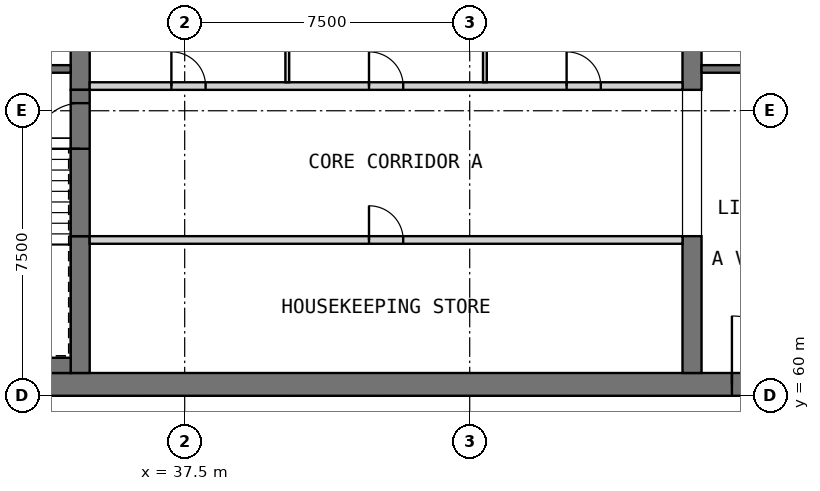
"""IFC4 building model, lengths in metres.
Left out: names, types, materials, properties, quantities, classifications, styles, units other than length and angle.
Written with IfcOpenShell. Run it as: python <this file> out.ifc"""

import sys

from ifc_helpers import new_model, si_unit, direction, frame, frame_2d, origin, place, context, subcontext, project, spatial, rectangle, extrude, element, fill, save


model = new_model("IFC4")
c1 = context("Model", 3, precision=1e-05, world=origin(), true_north=direction((0.0, 1.0)))
c2 = subcontext(c1, "Body", "Model", "MODEL_VIEW")
j1 = project(units=[si_unit("LENGTHUNIT", "METRE"), si_unit("PLANEANGLEUNIT", "RADIAN")], contexts=[c1])
p1 = place(None, origin())
s1 = spatial("IfcSite", under=j1, at=p1, CompositionType="ELEMENT")
p2 = place(p1, origin())
s2 = spatial("IfcBuilding", under=s1, at=p2, CompositionType="ELEMENT")
p3 = place(p2, frame((0.0, 0.0, 226.7)))
s3 = spatial("IfcBuildingStorey", under=s2, at=p3, CompositionType="ELEMENT", Elevation=226.7)
p4 = place(p3, frame((30.0, 60.3, 0.0), z_axis=(0.0, 0.0, 1.0), x_axis=(1.0, 0.0, 0.0)))
e1 = element("IfcWall", 1, at=p4, inside=s3, PredefinedType="SHEAR", context=c2, shape_type="SweptSolid", body=[
    extrude(rectangle(XDim=30.0, YDim=0.6, at=frame_2d((15.0, 0.0))), origin(), (0.0, 0.0, 1.0), 3.5),
])
p5 = place(p4, frame((21.9, 0.0, 0.0)))
e2 = element("IfcOpeningElement", 2, at=p5, cuts=e1, PredefinedType="OPENING", context=c2, shape_type="SweptSolid", body=[
    extrude(rectangle(XDim=1.8, YDim=2.1, at=frame_2d((0.9, 1.05))), frame((0.0, 0.31, 0.0), z_axis=(0.0, -1.0, 0.0), x_axis=(1.0, 0.0, 0.0)), (0.0, 0.0, 1.0), 0.62),
])
p6 = place(p4, frame((26.5, 0.0, 0.0)))
e3 = element("IfcOpeningElement", 3, at=p6, cuts=e1, PredefinedType="OPENING", context=c2, shape_type="SweptSolid", body=[
    extrude(rectangle(XDim=1.2, YDim=2.1, at=frame_2d((0.6, 1.05))), frame((0.0, 0.31, 0.0), z_axis=(0.0, -1.0, 0.0), x_axis=(1.0, 0.0, 0.0)), (0.0, 0.0, 1.0), 0.62),
])
p7 = place(p3, frame((34.75, 60.6, 0.0), z_axis=(0.0, 0.0, 1.0), x_axis=(0.0, 1.0, 0.0)))
e4 = element("IfcWall", 4, at=p7, inside=s3, PredefinedType="SHEAR", context=c2, shape_type="SweptSolid", body=[
    extrude(rectangle(XDim=3.6, YDim=0.5, at=frame_2d((1.8, 0.0))), origin(), (0.0, 0.0, 1.0), 3.5),
])
p8 = place(p3, frame((34.75, 68.05, 0.0), z_axis=(0.0, 0.0, 1.0), x_axis=(0.0, 1.0, 0.0)))
e5 = element("IfcWall", 5, at=p8, inside=s3, PredefinedType="SHEAR", context=c2, shape_type="SweptSolid", body=[
    extrude(rectangle(XDim=6.4, YDim=0.5, at=frame_2d((3.2, 0.0))), origin(), (0.0, 0.0, 1.0), 3.5),
])
p9 = place(p3, frame((50.85, 60.6, 0.0), z_axis=(0.0, 0.0, 1.0), x_axis=(0.0, 1.0, 0.0)))
e6 = element("IfcWall", 6, at=p9, inside=s3, PredefinedType="SHEAR", context=c2, shape_type="SweptSolid", body=[
    extrude(rectangle(XDim=3.6, YDim=0.5, at=frame_2d((1.8, 0.0))), origin(), (0.0, 0.0, 1.0), 3.5),
])
p10 = place(p3, frame((50.85, 68.05, 0.0), z_axis=(0.0, 0.0, 1.0), x_axis=(0.0, 1.0, 0.0)))
e7 = element("IfcWall", 7, at=p10, inside=s3, PredefinedType="SHEAR", context=c2, shape_type="SweptSolid", body=[
    extrude(rectangle(XDim=6.4, YDim=0.5, at=frame_2d((3.2, 0.0))), origin(), (0.0, 0.0, 1.0), 3.5),
])
p11 = place(p3, frame((35.0, 64.1, 0.0), z_axis=(0.0, 0.0, 1.0), x_axis=(1.0, 0.0, 0.0)))
e8 = element("IfcWall", 8, at=p11, inside=s3, PredefinedType="PARTITIONING", context=c2, shape_type="SweptSolid", body=[
    extrude(rectangle(XDim=15.6, YDim=0.2, at=frame_2d((7.8, 0.0))), origin(), (0.0, 0.0, 1.0), 3.25),
])
p12 = place(p11, frame((7.35, 0.0, 0.0)))
e9 = element("IfcOpeningElement", 9, at=p12, cuts=e8, PredefinedType="OPENING", context=c2, shape_type="SweptSolid", body=[
    extrude(rectangle(XDim=0.9, YDim=2.1, at=frame_2d((0.45, 1.05))), frame((0.0, 0.11, 0.0), z_axis=(0.0, -1.0, 0.0), x_axis=(1.0, 0.0, 0.0)), (0.0, 0.0, 1.0), 0.22),
])
p13 = place(p3, frame((35.0, 68.15, 0.0), z_axis=(0.0, 0.0, 1.0), x_axis=(1.0, 0.0, 0.0)))
e10 = element("IfcWall", 10, at=p13, inside=s3, PredefinedType="PARTITIONING", context=c2, shape_type="SweptSolid", body=[
    extrude(rectangle(XDim=15.6, YDim=0.2, at=frame_2d((7.8, 0.0))), origin(), (0.0, 0.0, 1.0), 3.25),
])
p14 = place(p13, frame((2.15, 0.0, 0.0)))
e11 = element("IfcOpeningElement", 11, at=p14, cuts=e10, PredefinedType="OPENING", context=c2, shape_type="SweptSolid", body=[
    extrude(rectangle(XDim=0.9, YDim=2.1, at=frame_2d((0.45, 1.05))), frame((0.0, 0.11, 0.0), z_axis=(0.0, -1.0, 0.0), x_axis=(1.0, 0.0, 0.0)), (0.0, 0.0, 1.0), 0.22),
])
p15 = place(p13, frame((7.35, 0.0, 0.0)))
e12 = element("IfcOpeningElement", 12, at=p15, cuts=e10, PredefinedType="OPENING", context=c2, shape_type="SweptSolid", body=[
    extrude(rectangle(XDim=0.9, YDim=2.1, at=frame_2d((0.45, 1.05))), frame((0.0, 0.11, 0.0), z_axis=(0.0, -1.0, 0.0), x_axis=(1.0, 0.0, 0.0)), (0.0, 0.0, 1.0), 0.22),
])
p16 = place(p13, frame((12.55, 0.0, 0.0)))
e13 = element("IfcOpeningElement", 13, at=p16, cuts=e10, PredefinedType="OPENING", context=c2, shape_type="SweptSolid", body=[
    extrude(rectangle(XDim=0.9, YDim=2.1, at=frame_2d((0.45, 1.05))), frame((0.0, 0.11, 0.0), z_axis=(0.0, -1.0, 0.0), x_axis=(1.0, 0.0, 0.0)), (0.0, 0.0, 1.0), 0.22),
])
for number, where, z_axis, x_axis in (
    (14, (40.2, 68.25, 0.0), (0.0, 0.0, 1.0), (0.0, 1.0, 0.0)),
    (15, (45.4, 68.25, 0.0), (0.0, 0.0, 1.0), (0.0, 1.0, 0.0)),
):
    element("IfcWall", number, at=place(p3, frame(where, z_axis=z_axis, x_axis=x_axis)), inside=s3, PredefinedType="PARTITIONING", context=c2, shape_type="SweptSolid", body=[
        extrude(rectangle(XDim=2.75, YDim=0.1, at=frame_2d((1.375, 0.0))), origin(), (0.0, 0.0, 1.0), 3.25),
    ])
p17 = place(p3, frame((34.75, 64.2, 0.0), z_axis=(0.0, 0.0, 1.0), x_axis=(0.0, 1.0, 0.0)))
e16 = element("IfcWall", 16, at=p17, inside=s3, PredefinedType="SOLIDWALL", context=c2, shape_type="SweptSolid", body=[
    extrude(rectangle(XDim=3.85, YDim=0.5, at=frame_2d((1.925, 0.0))), origin(), (0.0, 0.0, 1.0), 2.3),
])
p18 = place(p17, frame((2.3, 0.0, 0.0)))
e17 = element("IfcOpeningElement", 17, at=p18, cuts=e16, PredefinedType="OPENING", context=c2, shape_type="SweptSolid", body=[
    extrude(rectangle(XDim=1.2, YDim=2.1, at=frame_2d((0.6, 1.05))), frame((0.0, 0.26, 0.0), z_axis=(0.0, -1.0, 0.0), x_axis=(1.0, 0.0, 0.0)), (0.0, 0.0, 1.0), 0.52),
])
p19 = place(p3, frame((30.6, 68.6, 0.0), z_axis=(0.0, 0.0, 1.0), x_axis=(1.0, 0.0, 0.0)))
e18 = element("IfcWall", 18, at=p19, inside=s3, PredefinedType="SOLIDWALL", context=c2, shape_type="SweptSolid", body=[
    extrude(rectangle(XDim=3.9, YDim=0.2, at=frame_2d((1.95, 0.0))), origin(), (0.0, 0.0, 1.0), 3.25),
])
p20 = place(p19, frame((1.7, 0.0, 0.0)))
e19 = element("IfcOpeningElement", 19, at=p20, cuts=e18, PredefinedType="OPENING", context=c2, shape_type="SweptSolid", body=[
    extrude(rectangle(XDim=0.9, YDim=2.1, at=frame_2d((0.45, 1.05))), frame((0.0, 0.11, 0.0), z_axis=(0.0, -1.0, 0.0), x_axis=(1.0, 0.0, 0.0)), (0.0, 0.0, 1.0), 0.22),
])
p21 = place(p3, frame((51.1, 68.6, 0.0), z_axis=(0.0, 0.0, 1.0), x_axis=(1.0, 0.0, 0.0)))
e20 = element("IfcWall", 20, at=p21, inside=s3, PredefinedType="SOLIDWALL", context=c2, shape_type="SweptSolid", body=[
    extrude(rectangle(XDim=8.3, YDim=0.2, at=frame_2d((4.15, 0.0))), origin(), (0.0, 0.0, 1.0), 3.25),
])
p22 = place(p3, frame((31.0, 60.8, 0.0), z_axis=(0.0, 0.0, 1.0), x_axis=(1.0, 0.0, 0.0)))
e21 = element("IfcWall", 21, at=p22, inside=s3, PredefinedType="SOLIDWALL", context=c2, shape_type="SweptSolid", body=[
    extrude(rectangle(XDim=3.5, YDim=0.4, at=frame_2d((1.75, 0.0))), origin(), (0.0, 0.0, 1.0), 3.25),
])
p23 = place(p12, origin())
e22 = element("IfcDoor", 22, at=p23, inside=s3, OperationType="SINGLE_SWING_RIGHT", PredefinedType="DOOR", context=c2, shape_type="SweptSolid", body=[
    extrude(rectangle(XDim=0.9, YDim=2.1, at=frame_2d((0.45, 1.05))), frame((0.0, 0.025, 0.0), z_axis=(0.0, -1.0, 0.0), x_axis=(1.0, 0.0, 0.0)), (0.0, 0.0, 1.0), 0.05),
])
fill(e9, e22)
p24 = place(p14, origin())
e23 = element("IfcDoor", 23, at=p24, inside=s3, OperationType="SINGLE_SWING_RIGHT", PredefinedType="DOOR", context=c2, shape_type="SweptSolid", body=[
    extrude(rectangle(XDim=0.9, YDim=2.1, at=frame_2d((0.45, 1.05))), frame((0.0, 0.025, 0.0), z_axis=(0.0, -1.0, 0.0), x_axis=(1.0, 0.0, 0.0)), (0.0, 0.0, 1.0), 0.05),
])
fill(e11, e23)
p25 = place(p15, origin())
e24 = element("IfcDoor", 24, at=p25, inside=s3, OperationType="SINGLE_SWING_LEFT", PredefinedType="DOOR", context=c2, shape_type="SweptSolid", body=[
    extrude(rectangle(XDim=0.9, YDim=2.1, at=frame_2d((0.45, 1.05))), frame((0.0, 0.025, 0.0), z_axis=(0.0, -1.0, 0.0), x_axis=(1.0, 0.0, 0.0)), (0.0, 0.0, 1.0), 0.05),
])
fill(e12, e24)
p26 = place(p16, origin())
e25 = element("IfcDoor", 25, at=p26, inside=s3, OperationType="SINGLE_SWING_RIGHT", PredefinedType="DOOR", context=c2, shape_type="SweptSolid", body=[
    extrude(rectangle(XDim=0.9, YDim=2.1, at=frame_2d((0.45, 1.05))), frame((0.0, 0.025, 0.0), z_axis=(0.0, -1.0, 0.0), x_axis=(1.0, 0.0, 0.0)), (0.0, 0.0, 1.0), 0.05),
])
fill(e13, e25)
p27 = place(p5, origin())
e26 = element("IfcDoor", 26, at=p27, inside=s3, OperationType="DOUBLE_DOOR_SINGLE_SWING", PredefinedType="DOOR", context=c2, shape_type="SweptSolid", body=[
    extrude(rectangle(XDim=1.8, YDim=2.1, at=frame_2d((0.9, 1.05))), frame((0.0, 0.025, 0.0), z_axis=(0.0, -1.0, 0.0), x_axis=(1.0, 0.0, 0.0)), (0.0, 0.0, 1.0), 0.05),
])
fill(e2, e26)
p28 = place(p18, origin())
e27 = element("IfcDoor", 27, at=p28, inside=s3, OperationType="SINGLE_SWING_LEFT", PredefinedType="DOOR", context=c2, shape_type="SweptSolid", body=[
    extrude(rectangle(XDim=1.2, YDim=2.1, at=frame_2d((0.6, 1.05))), frame((0.0, 0.025, 0.0), z_axis=(0.0, -1.0, 0.0), x_axis=(1.0, 0.0, 0.0)), (0.0, 0.0, 1.0), 0.05),
])
fill(e17, e27)
save(model, sys.argv[1])
